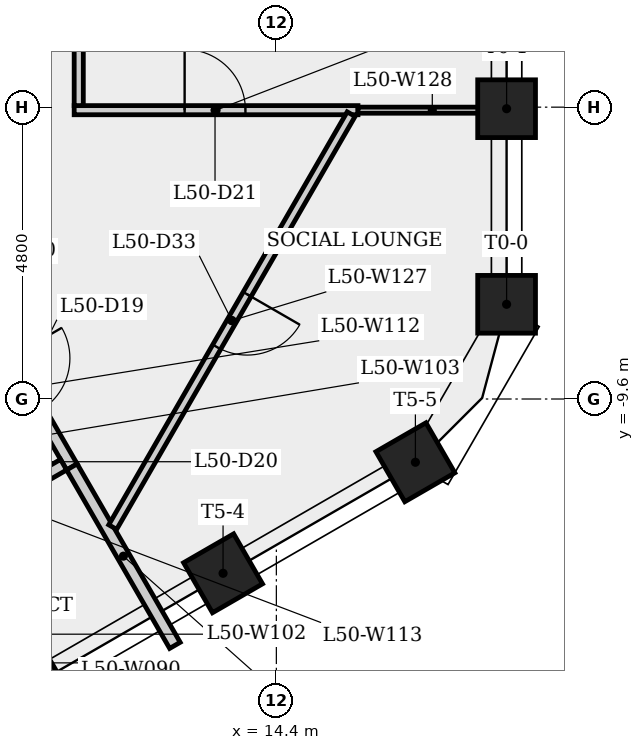
"""IFC4 building model, lengths in metres.
Left out: names, types, materials, properties, quantities, classifications, styles, units other than length and angle.
Written with IfcOpenShell. Run it as: python <this file> out.ifc"""

import sys

from ifc_helpers import new_model, si_unit, direction, frame, frame_2d, origin, origin_2d, place, context, subcontext, project, spatial, rectangle, extrude, element, fill, save


model = new_model("IFC4")
c1 = context("Model", 3, precision=1e-05, world=origin(), true_north=direction((0.0, 1.0)))
c2 = subcontext(c1, "Body", "Model", "MODEL_VIEW")
j1 = project(units=[si_unit("LENGTHUNIT", "METRE"), si_unit("PLANEANGLEUNIT", "RADIAN")], contexts=[c1])
p1 = place(None, origin())
s1 = spatial("IfcSite", under=j1, at=p1, CompositionType="ELEMENT")
p2 = place(p1, origin())
s2 = spatial("IfcBuilding", under=s1, at=p2, CompositionType="ELEMENT")
p3 = place(p2, frame((0.0, 0.0, 186.7)))
s3 = spatial("IfcBuildingStorey", under=s2, at=p3, CompositionType="ELEMENT", Elevation=186.7)
for number, where, z_axis, x_axis in (
    (1, (18.187, -8.042, 0.0), (0.0, 0.0, 1.0), (1.0, 0.0, 0.0)),
    (2, (18.187, -4.825, 0.0), (0.0, 0.0, 1.0), (1.0, 0.0, 0.0)),
    (3, (10.361, -14.293, 0.0), (0.0, 0.0, 1.0), (0.5, -0.866, 0.0)),
    (4, (13.523, -12.467, 0.0), (0.0, 0.0, 1.0), (0.5, -0.866, 0.0)),
    (5, (16.687, -10.64, 0.0), (0.0, 0.0, 1.0), (0.5, -0.866, 0.0)),
):
    element("IfcColumn", number, at=place(p3, frame(where, z_axis=z_axis, x_axis=x_axis)), inside=s3, PredefinedType="COLUMN", context=c2, shape_type="SweptSolid", body=[
        extrude(rectangle(XDim=0.95, YDim=0.95, at=origin_2d()), origin(), (0.0, 0.0, 1.0), 4.0),
    ])
p4 = place(p3, frame((9.537, -8.119, 0.0), z_axis=(0.0, 0.0, 1.0), x_axis=(0.499990139034, -0.866031096941, 0.0)))
e6 = element("IfcWall", 6, at=p4, inside=s3, PredefinedType="PARTITIONING", context=c2, shape_type="SweptSolid", body=[
    extrude(rectangle(XDim=3.0, YDim=0.2, at=frame_2d((1.5, 0.0))), origin(), (0.0, 0.0, 1.0), 3.6),
])
p5 = place(p4, frame((0.935, 0.0, 0.0)))
e7 = element("IfcOpeningElement", 7, at=p5, cuts=e6, PredefinedType="OPENING", context=c2, shape_type="SweptSolid", body=[
    extrude(rectangle(XDim=1.0, YDim=2.1, at=frame_2d((0.5, 1.05))), frame((0.0, 0.11, 0.0), z_axis=(0.0, -1.0, 0.0), x_axis=(1.0, 0.0, 0.0)), (0.0, 0.0, 1.0), 0.22),
])
p6 = place(p3, frame((10.901, -10.681, 0.0), z_axis=(0.0, 0.0, 1.0), x_axis=(-0.866007538022, -0.500030943131, 0.0)))
e8 = element("IfcWall", 8, at=p6, inside=s3, PredefinedType="PLUMBINGWALL", context=c2, shape_type="SweptSolid", body=[
    extrude(rectangle(XDim=2.375, YDim=0.2, at=frame_2d((1.188, 0.0))), origin(), (0.0, 0.0, 1.0), 3.6),
])
p7 = place(p3, frame((11.037, -10.717, 0.0), z_axis=(0.0, 0.0, 1.0), x_axis=(0.499982299553, -0.866035622901, 0.0)))
e9 = element("IfcWall", 9, at=p7, inside=s3, PredefinedType="PLUMBINGWALL", context=c2, shape_type="SweptSolid", body=[
    extrude(rectangle(XDim=3.389, YDim=0.2, at=frame_2d((1.694, 0.0))), origin(), (0.0, 0.0, 1.0), 3.6),
])
p8 = place(p3, frame((11.075, -4.85, 0.0), z_axis=(0.0, 0.0, 1.0), x_axis=(1.0, 0.0, 0.0)))
e10 = element("IfcWall", 10, at=p8, inside=s3, PredefinedType="PARTITIONING", context=c2, shape_type="SweptSolid", body=[
    extrude(rectangle(XDim=4.667, YDim=0.15, at=frame_2d((2.334, 0.0))), origin(), (0.0, 0.0, 1.0), 3.6),
])
p9 = place(p8, frame((1.816, 0.0, 0.0)))
e11 = element("IfcOpeningElement", 11, at=p9, cuts=e10, PredefinedType="OPENING", context=c2, shape_type="SweptSolid", body=[
    extrude(rectangle(XDim=1.0, YDim=2.1, at=frame_2d((0.5, 1.05))), frame((0.0, 0.085, 0.0), z_axis=(0.0, -1.0, 0.0), x_axis=(1.0, 0.0, 0.0)), (0.0, 0.0, 1.0), 0.17),
])
p10 = place(p3, frame((11.15, -4.775, 0.0), z_axis=(0.0, 0.0, 1.0), x_axis=(0.0, 1.0, 0.0)))
e12 = element("IfcWall", 12, at=p10, inside=s3, PredefinedType="PARTITIONING", context=c2, shape_type="SweptSolid", body=[
    extrude(rectangle(XDim=9.549, YDim=0.15, at=frame_2d((4.775, 0.0))), origin(), (0.0, 0.0, 1.0), 3.6),
])
p11 = place(p10, frame((4.275, 0.0, 0.0)))
e13 = element("IfcOpeningElement", 13, at=p11, cuts=e12, PredefinedType="OPENING", context=c2, shape_type="SweptSolid", body=[
    extrude(rectangle(XDim=1.0, YDim=2.1, at=frame_2d((0.5, 1.05))), frame((0.0, 0.085, 0.0), z_axis=(0.0, -1.0, 0.0), x_axis=(1.0, 0.0, 0.0)), (0.0, 0.0, 1.0), 0.17),
])
p12 = place(p10, frame((7.448, 0.0, 0.0)))
e14 = element("IfcOpeningElement", 14, at=p12, cuts=e12, PredefinedType="OPENING", context=c2, shape_type="SweptSolid", body=[
    extrude(rectangle(XDim=1.0, YDim=2.1, at=frame_2d((0.5, 1.05))), frame((0.0, 0.085, 0.0), z_axis=(0.0, -1.0, 0.0), x_axis=(1.0, 0.0, 0.0)), (0.0, 0.0, 1.0), 0.17),
])
p13 = place(p3, frame((15.63, -4.915, 0.0), z_axis=(0.0, 0.0, 1.0), x_axis=(-0.499989217622, -0.866031628904, 0.0)))
e15 = element("IfcWall", 15, at=p13, inside=s3, PredefinedType="PARTITIONING", context=c2, shape_type="SweptSolid", body=[
    extrude(rectangle(XDim=7.843, YDim=0.15, at=frame_2d((3.921, 0.0))), origin(), (0.0, 0.0, 1.0), 3.6),
])
p14 = place(p13, frame((3.421, 0.0, 0.0)))
e16 = element("IfcOpeningElement", 16, at=p14, cuts=e15, PredefinedType="OPENING", context=c2, shape_type="SweptSolid", body=[
    extrude(rectangle(XDim=1.0, YDim=2.1, at=frame_2d((0.5, 1.05))), frame((0.0, 0.085, 0.0), z_axis=(0.0, -1.0, 0.0), x_axis=(1.0, 0.0, 0.0)), (0.0, 0.0, 1.0), 0.17),
])
p15 = place(p3, frame((18.187, -4.85, 0.0), z_axis=(0.0, 0.0, 1.0), x_axis=(-1.0, 0.0, 0.0)))
e17 = element("IfcWall", 17, at=p15, inside=s3, PredefinedType="PARTITIONING", context=c2, shape_type="SweptSolid", body=[
    extrude(rectangle(XDim=2.444, YDim=0.1, at=frame_2d((1.222, 0.0))), origin(), (0.0, 0.0, 1.0), 3.6),
])
p16 = place(p9, origin())
e18 = element("IfcDoor", 18, at=p16, inside=s3, OperationType="SINGLE_SWING_LEFT", PredefinedType="DOOR", context=c2, shape_type="SweptSolid", body=[
    extrude(rectangle(XDim=1.0, YDim=2.1, at=frame_2d((0.5, 1.05))), frame((0.0, 0.025, 0.0), z_axis=(0.0, -1.0, 0.0), x_axis=(1.0, 0.0, 0.0)), (0.0, 0.0, 1.0), 0.05),
])
fill(e11, e18)
p17 = place(p14, origin())
e19 = element("IfcDoor", 19, at=p17, inside=s3, OperationType="SINGLE_SWING_LEFT", PredefinedType="DOOR", context=c2, shape_type="SweptSolid", body=[
    extrude(rectangle(XDim=1.0, YDim=2.1, at=frame_2d((0.5, 1.05))), frame((0.0, 0.025, 0.0), z_axis=(0.0, -1.0, 0.0), x_axis=(1.0, 0.0, 0.0)), (0.0, 0.0, 1.0), 0.05),
])
fill(e16, e19)
save(model, sys.argv[1])
